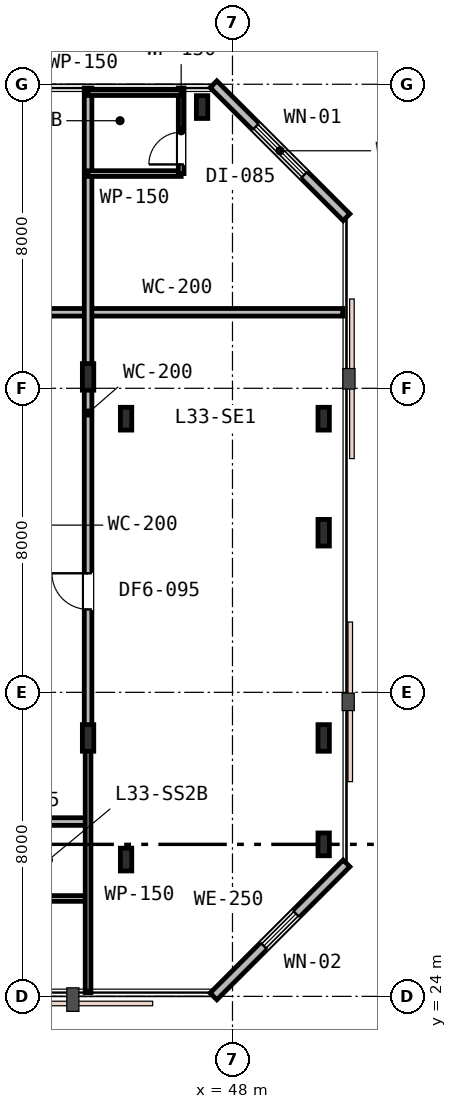
"""IFC4 building model, lengths in metres.
Left out: names, types, materials, properties, quantities, classifications, styles, units other than length and angle.
Written with IfcOpenShell. Run it as: python <this file> out.ifc"""

import sys

from ifc_helpers import new_model, si_unit, direction, frame, frame_2d, origin, origin_2d, place, context, subcontext, project, spatial, rectangle, i_section, extrude, element, fill, save


model = new_model("IFC4")
c1 = context("Model", 3, precision=1e-05, world=origin(), true_north=direction((0.0, 1.0)))
c2 = subcontext(c1, "Body", "Model", "MODEL_VIEW")
j1 = project(units=[si_unit("LENGTHUNIT", "METRE"), si_unit("PLANEANGLEUNIT", "RADIAN")], contexts=[c1])
p1 = place(None, origin())
s1 = spatial("IfcSite", under=j1, at=p1, CompositionType="ELEMENT")
p2 = place(p1, origin())
s2 = spatial("IfcBuilding", under=s1, at=p2, CompositionType="ELEMENT")
p3 = place(p2, frame((0.0, 0.0, 129.6)))
s3 = spatial("IfcBuildingStorey", under=s2, at=p3, CompositionType="ELEMENT", Elevation=129.6)
for number, where, z_axis, x_axis in (
    (1, (45.2, 27.6, 0.0), (0.0, 0.0, 1.0), (1.0, 0.0, 0.0)),
    (2, (45.2, 39.2, 0.0), (0.0, 0.0, 1.0), (1.0, 0.0, 0.0)),
    (3, (47.2, 47.4, 0.0), (0.0, 0.0, 1.0), (1.0, 0.0, 0.0)),
    (4, (50.4, 28.0, 0.0), (0.0, 0.0, 1.0), (1.0, 0.0, 0.0)),
    (5, (50.4, 39.2, 0.0), (0.0, 0.0, 1.0), (1.0, 0.0, 0.0)),
):
    element("IfcColumn", number, at=place(p3, frame(where, z_axis=z_axis, x_axis=x_axis)), inside=s3, PredefinedType="COLUMN", context=c2, shape_type="SweptSolid", body=[
        extrude(i_section(OverallWidth=0.3, OverallDepth=0.6, WebThickness=0.015, FlangeThickness=0.03, FilletRadius=0.027, at=origin_2d()), origin(), (0.0, 0.0, 1.0), 3.6),
    ])
for number, where, z_axis, x_axis in (
    (6, (44.2, 30.8, 0.0), (0.0, 0.0, 1.0), (1.0, 0.0, 0.0)),
    (7, (44.2, 40.3, 0.0), (0.0, 0.0, 1.0), (1.0, 0.0, 0.0)),
    (8, (50.4, 30.8, 0.0), (0.0, 0.0, 1.0), (1.0, 0.0, 0.0)),
    (9, (50.4, 36.2, 0.0), (0.0, 0.0, 1.0), (1.0, 0.0, 0.0)),
):
    element("IfcColumn", number, at=place(p3, frame(where, z_axis=z_axis, x_axis=x_axis)), inside=s3, PredefinedType="COLUMN", context=c2, shape_type="SweptSolid", body=[
        extrude(i_section(OverallWidth=0.3, OverallDepth=0.7, WebThickness=0.017, FlangeThickness=0.032, FilletRadius=0.027, at=origin_2d()), origin(), (0.0, 0.0, 1.0), 3.6),
    ])
p4 = place(p3, frame((47.5, 24.0, 0.0), z_axis=(0.0, 0.0, 1.0), x_axis=(0.707106781187, 0.707106781187, 0.0)))
e10 = element("IfcWall", 10, at=p4, inside=s3, PredefinedType="STANDARD", context=c2, shape_type="SweptSolid", body=[
    extrude(rectangle(XDim=4.95, YDim=0.25, at=frame_2d((2.475, 0.0))), origin(), (0.0, 0.0, 1.0), 3.33),
])
p5 = place(p4, frame((1.875, 0.0, 0.85)))
e11 = element("IfcOpeningElement", 11, at=p5, cuts=e10, PredefinedType="OPENING", context=c2, shape_type="SweptSolid", body=[
    extrude(rectangle(XDim=1.2, YDim=1.6, at=frame_2d((0.6, 0.8))), frame((0.0, 0.135, 0.0), z_axis=(0.0, -1.0, 0.0), x_axis=(1.0, 0.0, 0.0)), (0.0, 0.0, 1.0), 0.27),
])
p6 = place(p3, frame((51.0, 44.5, 0.0), z_axis=(0.0, 0.0, 1.0), x_axis=(-0.707106781187, 0.707106781187, 0.0)))
e12 = element("IfcWall", 12, at=p6, inside=s3, PredefinedType="STANDARD", context=c2, shape_type="SweptSolid", body=[
    extrude(rectangle(XDim=4.95, YDim=0.25, at=frame_2d((2.475, 0.0))), origin(), (0.0, 0.0, 1.0), 3.33),
])
p7 = place(p6, frame((1.575, 0.0, 0.75)))
e13 = element("IfcOpeningElement", 13, at=p7, cuts=e12, PredefinedType="OPENING", context=c2, shape_type="SweptSolid", body=[
    extrude(rectangle(XDim=1.8, YDim=1.85, at=frame_2d((0.9, 0.925))), frame((0.0, 0.135, 0.0), z_axis=(0.0, -1.0, 0.0), x_axis=(1.0, 0.0, 0.0)), (0.0, 0.0, 1.0), 0.27),
])
p8 = place(p3, frame((7.2, 28.6, 0.0), z_axis=(0.0, 0.0, 1.0), x_axis=(1.0, 0.0, 0.0)))
e14 = element("IfcWall", 14, at=p8, inside=s3, PredefinedType="PARTITIONING", context=c2, shape_type="SweptSolid", body=[
    extrude(rectangle(XDim=37.0, YDim=0.2, at=frame_2d((18.5, 0.0))), origin(), (0.0, 0.0, 1.0), 2.87),
])
p9 = place(p8, frame((19.71, 0.0, 0.0)))
e15 = element("IfcOpeningElement", 15, at=p9, cuts=e14, PredefinedType="OPENING", context=c2, shape_type="SweptSolid", body=[
    extrude(rectangle(XDim=0.95, YDim=2.15, at=frame_2d((0.475, 1.075))), frame((0.0, 0.11, 0.0), z_axis=(0.0, -1.0, 0.0), x_axis=(1.0, 0.0, 0.0)), (0.0, 0.0, 1.0), 0.22),
])
p10 = place(p8, frame((29.78, 0.0, 0.0)))
e16 = element("IfcOpeningElement", 16, at=p10, cuts=e14, PredefinedType="OPENING", context=c2, shape_type="SweptSolid", body=[
    extrude(rectangle(XDim=0.95, YDim=2.15, at=frame_2d((0.475, 1.075))), frame((0.0, 0.11, 0.0), z_axis=(0.0, -1.0, 0.0), x_axis=(1.0, 0.0, 0.0)), (0.0, 0.0, 1.0), 0.22),
])
p11 = place(p3, frame((42.2, 42.0, 0.0), z_axis=(0.0, 0.0, 1.0), x_axis=(1.0, 0.0, 0.0)))
e17 = element("IfcWall", 17, at=p11, inside=s3, PredefinedType="PARTITIONING", context=c2, shape_type="SweptSolid", body=[
    extrude(rectangle(XDim=8.7, YDim=0.2, at=frame_2d((4.35, 0.0))), origin(), (0.0, 0.0, 1.0), 3.33),
])
p12 = place(p3, frame((41.75, 26.576, 0.0), z_axis=(0.0, 0.0, 1.0), x_axis=(1.0, 0.0, 0.0)))
e18 = element("IfcWall", 18, at=p12, inside=s3, PredefinedType="PARTITIONING", context=c2, shape_type="SweptSolid", body=[
    extrude(rectangle(XDim=2.45, YDim=0.15, at=frame_2d((1.225, 0.0))), origin(), (0.0, 0.0, 1.0), 3.33),
])
p13 = place(p3, frame((44.2, 30.8, 0.0), z_axis=(0.0, 0.0, 1.0), x_axis=(0.0, -1.0, 0.0)))
e19 = element("IfcWall", 19, at=p13, inside=s3, PredefinedType="PARTITIONING", context=c2, shape_type="SweptSolid", body=[
    extrude(rectangle(XDim=6.7, YDim=0.15, at=frame_2d((3.35, 0.0))), origin(), (0.0, 0.0, 1.0), 2.87),
])
p14 = place(p3, frame((44.2, 30.8, 0.0), z_axis=(0.0, 0.0, 1.0), x_axis=(0.0, 1.0, 0.0)))
e20 = element("IfcWall", 20, at=p14, inside=s3, PredefinedType="PARTITIONING", context=c2, shape_type="SweptSolid", body=[
    extrude(rectangle(XDim=17.1, YDim=0.2, at=frame_2d((8.55, 0.0))), origin(), (0.0, 0.0, 1.0), 2.87),
])
p15 = place(p14, frame((3.382, 0.0, 0.0)))
e21 = element("IfcOpeningElement", 21, at=p15, cuts=e20, PredefinedType="OPENING", context=c2, shape_type="SweptSolid", body=[
    extrude(rectangle(XDim=0.95, YDim=2.15, at=frame_2d((0.475, 1.075))), frame((0.0, 0.11, 0.0), z_axis=(0.0, -1.0, 0.0), x_axis=(1.0, 0.0, 0.0)), (0.0, 0.0, 1.0), 0.22),
])
p16 = place(p3, frame((44.2, 45.65, 0.0), z_axis=(0.0, 0.0, 1.0), x_axis=(1.0, 0.0, 0.0)))
e22 = element("IfcWall", 22, at=p16, inside=s3, PredefinedType="PARTITIONING", context=c2, shape_type="SweptSolid", body=[
    extrude(rectangle(XDim=2.45, YDim=0.15, at=frame_2d((1.225, 0.0))), origin(), (0.0, 0.0, 1.0), 3.33),
])
p17 = place(p3, frame((46.65, 45.65, 0.0), z_axis=(0.0, 0.0, 1.0), x_axis=(0.0, 1.0, 0.0)))
e23 = element("IfcWall", 23, at=p17, inside=s3, PredefinedType="PARTITIONING", context=c2, shape_type="SweptSolid", body=[
    extrude(rectangle(XDim=2.25, YDim=0.15, at=frame_2d((1.125, 0.0))), origin(), (0.0, 0.0, 1.0), 2.96),
])
p18 = place(p17, frame((0.24, 0.0, 0.0)))
e24 = element("IfcOpeningElement", 24, at=p18, cuts=e23, PredefinedType="OPENING", context=c2, shape_type="SweptSolid", body=[
    extrude(rectangle(XDim=0.85, YDim=2.15, at=frame_2d((0.425, 1.075))), frame((0.0, 0.085, 0.0), z_axis=(0.0, -1.0, 0.0), x_axis=(1.0, 0.0, 0.0)), (0.0, 0.0, 1.0), 0.17),
])
p19 = place(p3, frame((44.2, 47.78, 0.0), z_axis=(0.0, 0.0, 1.0), x_axis=(1.0, 0.0, 0.0)))
e25 = element("IfcWall", 25, at=p19, inside=s3, PredefinedType="PARTITIONING", context=c2, shape_type="SweptSolid", body=[
    extrude(rectangle(XDim=2.45, YDim=0.15, at=frame_2d((1.225, 0.0))), origin(), (0.0, 0.0, 1.0), 2.96),
])
p20 = place(p5, origin())
e26 = element("IfcWindow", 26, at=p20, inside=s3, PartitioningType="SINGLE_PANEL", PredefinedType="WINDOW", context=c2, shape_type="SweptSolid", body=[
    extrude(rectangle(XDim=1.2, YDim=1.6, at=frame_2d((0.6, 0.8))), frame((0.0, 0.03, 0.0), z_axis=(0.0, -1.0, 0.0), x_axis=(1.0, 0.0, 0.0)), (0.0, 0.0, 1.0), 0.06),
])
fill(e11, e26)
p21 = place(p7, origin())
e27 = element("IfcWindow", 27, at=p21, inside=s3, PartitioningType="SINGLE_PANEL", PredefinedType="WINDOW", context=c2, shape_type="SweptSolid", body=[
    extrude(rectangle(XDim=1.8, YDim=1.85, at=frame_2d((0.9, 0.925))), frame((0.0, 0.03, 0.0), z_axis=(0.0, -1.0, 0.0), x_axis=(1.0, 0.0, 0.0)), (0.0, 0.0, 1.0), 0.06),
])
fill(e13, e27)
p22 = place(p15, origin())
e28 = element("IfcDoor", 28, at=p22, inside=s3, OperationType="SINGLE_SWING_RIGHT", PredefinedType="DOOR", context=c2, shape_type="SweptSolid", body=[
    extrude(rectangle(XDim=0.95, YDim=2.15, at=frame_2d((0.475, 1.075))), frame((0.0, 0.025, 0.0), z_axis=(0.0, -1.0, 0.0), x_axis=(1.0, 0.0, 0.0)), (0.0, 0.0, 1.0), 0.05),
])
fill(e21, e28)
p23 = place(p18, origin())
e29 = element("IfcDoor", 29, at=p23, inside=s3, OperationType="SINGLE_SWING_LEFT", PredefinedType="DOOR", context=c2, shape_type="SweptSolid", body=[
    extrude(rectangle(XDim=0.85, YDim=2.15, at=frame_2d((0.425, 1.075))), frame((0.0, 0.025, 0.0), z_axis=(0.0, -1.0, 0.0), x_axis=(1.0, 0.0, 0.0)), (0.0, 0.0, 1.0), 0.05),
])
fill(e24, e29)
save(model, sys.argv[1])
